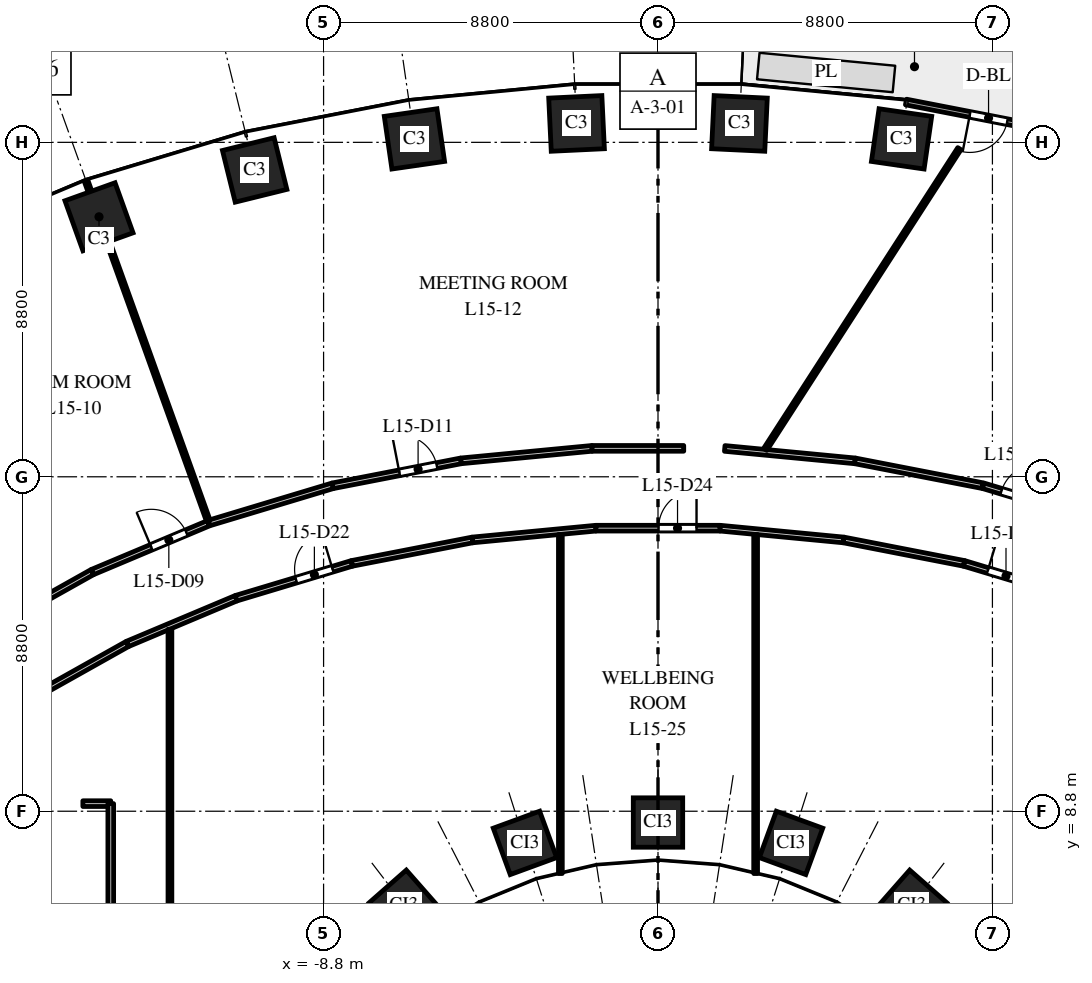
"""IFC4 building model, lengths in metres.
Left out: names, types, materials, properties, quantities, classifications, styles, units other than length and angle.
Written with IfcOpenShell. Run it as: python <this file> out.ifc"""

import sys

from ifc_helpers import new_model, si_unit, direction, frame, frame_2d, origin, origin_2d, place, context, subcontext, project, spatial, rectangle, extrude, element, fill, save


model = new_model("IFC4")
c1 = context("Model", 3, precision=1e-05, world=origin(), true_north=direction((0.0, 1.0)))
c2 = subcontext(c1, "Body", "Model", "MODEL_VIEW")
j1 = project(units=[si_unit("LENGTHUNIT", "METRE"), si_unit("PLANEANGLEUNIT", "RADIAN")], contexts=[c1])
p1 = place(None, origin())
s1 = spatial("IfcSite", under=j1, at=p1, CompositionType="ELEMENT")
p2 = place(p1, origin())
s2 = spatial("IfcBuilding", under=s1, at=p2, CompositionType="ELEMENT")
p3 = place(p2, frame((0.0, 0.0, 70.5)))
s3 = spatial("IfcBuildingStorey", under=s2, at=p3, CompositionType="ELEMENT", Elevation=70.5)
for number, where, z_axis, x_axis in (
    (1, (6.409, 26.491, 0.0), (0.0, 0.0, 1.0), (-0.99, 0.143, 0.0)),
    (2, (2.143, 26.898, 0.0), (0.0, 0.0, 1.0), (-0.999, 0.048, 0.0)),
    (3, (-2.143, 26.898, 0.0), (0.0, 0.0, 1.0), (-0.999, -0.048, 0.0)),
    (4, (-6.409, 26.491, 0.0), (0.0, 0.0, 1.0), (-0.99, -0.143, 0.0)),
    (5, (-10.613, 25.674, 0.0), (0.0, 0.0, 1.0), (-0.971, -0.24, 0.0)),
    (6, (-14.709, 24.441, 0.0), (0.0, 0.0, 1.0), (-0.941, -0.338, 0.0)),
):
    element("IfcColumn", number, at=place(p3, frame(where, z_axis=z_axis, x_axis=x_axis)), inside=s3, PredefinedType="COLUMN", context=c2, shape_type="SweptSolid", body=[
        extrude(rectangle(XDim=1.4, YDim=1.4, at=origin_2d()), origin(), (0.0, 0.0, 1.0), 4.0),
    ])
for number, where, z_axis, x_axis in (
    (7, (6.682, 6.334, 0.0), (0.0, 0.0, 1.0), (-0.751, 0.66, 0.0)),
    (8, (3.501, 7.967, 0.0), (0.0, 0.0, 1.0), (-0.939, 0.344, 0.0)),
    (9, (0.0, 8.503, 0.0), (0.0, 0.0, 1.0), (-1.0, 0.0, 0.0)),
    (10, (-3.501, 7.967, 0.0), (0.0, 0.0, 1.0), (-0.939, -0.344, 0.0)),
    (11, (-6.682, 6.334, 0.0), (0.0, 0.0, 1.0), (-0.751, -0.66, 0.0)),
):
    element("IfcColumn", number, at=place(p3, frame(where, z_axis=z_axis, x_axis=x_axis)), inside=s3, PredefinedType="COLUMN", context=c2, shape_type="SweptSolid", body=[
        extrude(rectangle(XDim=1.3, YDim=1.3, at=origin_2d()), origin(), (0.0, 0.0, 1.0), 4.0),
    ])
p4 = place(p3, frame((10.871, 26.617, 0.0), z_axis=(0.0, 0.0, 1.0), x_axis=(-0.981631174778, 0.190788460615, 0.0)))
e12 = element("IfcWall", 12, at=p4, inside=s3, PredefinedType="STANDARD", context=c2, shape_type="SweptSolid", body=[
    extrude(rectangle(XDim=4.426, YDim=0.15, at=frame_2d((2.213, 0.0))), origin(), (0.0, 0.0, 1.0), 3.7),
])
p5 = place(p4, frame((1.713, 0.0, 0.0)))
e13 = element("IfcOpeningElement", 13, at=p5, cuts=e12, PredefinedType="OPENING", context=c2, shape_type="SweptSolid", body=[
    extrude(rectangle(XDim=1.0, YDim=2.4, at=frame_2d((0.5, 1.2))), frame((0.0, 0.085, 0.0), z_axis=(0.0, -1.0, 0.0), x_axis=(1.0, 0.0, 0.0)), (0.0, 0.0, 1.0), 0.17),
])
p6 = place(p3, frame((-17.699, 13.513, 0.0), z_axis=(0.0, 0.0, 1.0), x_axis=(0.872072163686, 0.489377299559, 0.0)))
e14 = element("IfcWall", 14, at=p6, inside=s3, PredefinedType="PARTITIONING", context=c2, shape_type="SweptSolid", body=[
    extrude(rectangle(XDim=3.227, YDim=0.15, at=frame_2d((1.613, 0.0))), origin(), (0.0, 0.0, 1.0), 3.7),
])
p7 = place(p3, frame((-16.576, 11.735, 0.0), z_axis=(0.0, 0.0, 1.0), x_axis=(0.872164226045, 0.489213207924, 0.0)))
e15 = element("IfcWall", 15, at=p7, inside=s3, PredefinedType="PARTITIONING", context=c2, shape_type="SweptSolid", body=[
    extrude(rectangle(XDim=2.998, YDim=0.15, at=frame_2d((1.499, 0.0))), origin(), (0.0, 0.0, 1.0), 2.75),
])
p8 = place(p3, frame((-15.134, 9.0, 0.0), z_axis=(0.0, 0.0, 1.0), x_axis=(1.0, 0.0, 0.0)))
e16 = element("IfcWall", 16, at=p8, inside=s3, PredefinedType="PARTITIONING", context=c2, shape_type="SweptSolid", body=[
    extrude(rectangle(XDim=0.734, YDim=0.15, at=frame_2d((0.367, 0.0))), origin(), (0.0, 0.0, 1.0), 3.7),
])
p9 = place(p3, frame((-15.048, 25.383, 0.0), z_axis=(0.0, 0.0, 1.0), x_axis=(0.338338680362, -0.941024408488, 0.0)))
e17 = element("IfcWall", 17, at=p9, inside=s3, PredefinedType="PARTITIONING", context=c2, shape_type="SweptSolid", body=[
    extrude(rectangle(XDim=9.559, YDim=0.1, at=frame_2d((4.779, 0.0))), origin(), (0.0, 0.0, 1.0), 2.85),
])
p10 = place(p3, frame((-14.885, 15.092, 0.0), z_axis=(0.0, 0.0, 1.0), x_axis=(0.921844706698, 0.387559462189, 0.0)))
e18 = element("IfcWall", 18, at=p10, inside=s3, PredefinedType="PARTITIONING", context=c2, shape_type="SweptSolid", body=[
    extrude(rectangle(XDim=3.313, YDim=0.15, at=frame_2d((1.656, 0.0))), origin(), (0.0, 0.0, 1.0), 2.85),
])
p11 = place(p10, frame((1.684, 0.0, 0.0)))
e19 = element("IfcOpeningElement", 19, at=p11, cuts=e18, PredefinedType="OPENING", context=c2, shape_type="SweptSolid", body=[
    extrude(rectangle(XDim=1.0, YDim=2.1, at=frame_2d((0.5, 1.05))), frame((0.0, 0.085, 0.0), z_axis=(0.0, -1.0, 0.0), x_axis=(1.0, 0.0, 0.0)), (0.0, 0.0, 1.0), 0.17),
])
p12 = place(p3, frame((-14.4, -9.0, 0.0), z_axis=(0.0, 0.0, 1.0), x_axis=(0.0, 1.0, 0.0)))
e20 = element("IfcWall", 20, at=p12, inside=s3, PredefinedType="PARTITIONING", context=c2, shape_type="SweptSolid", body=[
    extrude(rectangle(XDim=18.0, YDim=0.15, at=frame_2d((9.0, 0.0))), origin(), (0.0, 0.0, 1.0), 3.7),
])
p13 = place(p12, frame((0.65, 0.0, 0.0)))
e21 = element("IfcOpeningElement", 21, at=p13, cuts=e20, PredefinedType="OPENING", context=c2, shape_type="SweptSolid", body=[
    extrude(rectangle(XDim=1.0, YDim=2.1, at=frame_2d((0.5, 1.05))), frame((0.0, 0.085, 0.0), z_axis=(0.0, -1.0, 0.0), x_axis=(1.0, 0.0, 0.0)), (0.0, 0.0, 1.0), 0.17),
])
p14 = place(p3, frame((-13.961, 13.202, 0.0), z_axis=(0.0, 0.0, 1.0), x_axis=(0.921753827375, 0.387775555857, 0.0)))
e22 = element("IfcWall", 22, at=p14, inside=s3, PredefinedType="PARTITIONING", context=c2, shape_type="SweptSolid", body=[
    extrude(rectangle(XDim=3.103, YDim=0.15, at=frame_2d((1.551, 0.0))), origin(), (0.0, 0.0, 1.0), 2.85),
])
p15 = place(p3, frame((-12.843, -13.587, 0.0), z_axis=(0.0, 0.0, 1.0), x_axis=(0.0, 1.0, 0.0)))
e23 = element("IfcWall", 23, at=p15, inside=s3, PredefinedType="PARTITIONING", context=c2, shape_type="SweptSolid", body=[
    extrude(rectangle(XDim=27.174, YDim=0.1, at=frame_2d((13.587, 0.0))), origin(), (0.0, 0.0, 1.0), 2.75),
])
p16 = place(p3, frame((-11.812, 16.384, 0.0), z_axis=(0.0, 0.0, 1.0), x_axis=(0.95754884035, 0.28827108482, 0.0)))
e24 = element("IfcWall", 24, at=p16, inside=s3, PredefinedType="PARTITIONING", context=c2, shape_type="SweptSolid", body=[
    extrude(rectangle(XDim=3.396, YDim=0.15, at=frame_2d((1.698, 0.0))), origin(), (0.0, 0.0, 1.0), 3.7),
])
p17 = place(p3, frame((-11.101, 14.405, 0.0), z_axis=(0.0, 0.0, 1.0), x_axis=(0.957612601062, 0.28805920622, 0.0)))
e25 = element("IfcWall", 25, at=p17, inside=s3, PredefinedType="PARTITIONING", context=c2, shape_type="SweptSolid", body=[
    extrude(rectangle(XDim=3.18, YDim=0.15, at=frame_2d((1.59, 0.0))), origin(), (0.0, 0.0, 1.0), 3.7),
])
p18 = place(p17, frame((1.65, 0.0, 0.0)))
e26 = element("IfcOpeningElement", 26, at=p18, cuts=e25, PredefinedType="OPENING", context=c2, shape_type="SweptSolid", body=[
    extrude(rectangle(XDim=1.0, YDim=2.1, at=frame_2d((0.5, 1.05))), frame((0.0, 0.085, 0.0), z_axis=(0.0, -1.0, 0.0), x_axis=(1.0, 0.0, 0.0)), (0.0, 0.0, 1.0), 0.17),
])
p19 = place(p3, frame((-8.56, 17.363, 0.0), z_axis=(0.0, 0.0, 1.0), x_axis=(0.981639027618, 0.1907480523, 0.0)))
e27 = element("IfcWall", 27, at=p19, inside=s3, PredefinedType="PARTITIONING", context=c2, shape_type="SweptSolid", body=[
    extrude(rectangle(XDim=3.439, YDim=0.15, at=frame_2d((1.72, 0.0))), origin(), (0.0, 0.0, 1.0), 2.85),
])
p20 = place(p19, frame((1.789, 0.0, 0.0)))
e28 = element("IfcOpeningElement", 28, at=p20, cuts=e27, PredefinedType="OPENING", context=c2, shape_type="SweptSolid", body=[
    extrude(rectangle(XDim=1.0, YDim=2.1, at=frame_2d((0.5, 1.05))), frame((0.0, 0.085, 0.0), z_axis=(0.0, -1.0, 0.0), x_axis=(1.0, 0.0, 0.0)), (0.0, 0.0, 1.0), 0.17),
])
p21 = place(p3, frame((-8.056, 15.321, 0.0), z_axis=(0.0, 0.0, 1.0), x_axis=(0.981604377859, 0.190926282547, 0.0)))
e29 = element("IfcWall", 29, at=p21, inside=s3, PredefinedType="PARTITIONING", context=c2, shape_type="SweptSolid", body=[
    extrude(rectangle(XDim=3.231, YDim=0.15, at=frame_2d((1.616, 0.0))), origin(), (0.0, 0.0, 1.0), 2.85),
])
p22 = place(p3, frame((-5.184, 18.019, 0.0), z_axis=(0.0, 0.0, 1.0), x_axis=(0.995482474707, 0.09494547146, 0.0)))
e30 = element("IfcWall", 30, at=p22, inside=s3, PredefinedType="PARTITIONING", context=c2, shape_type="SweptSolid", body=[
    extrude(rectangle(XDim=3.464, YDim=0.15, at=frame_2d((1.732, 0.0))), origin(), (0.0, 0.0, 1.0), 3.7),
])
p23 = place(p3, frame((-4.884, 15.938, 0.0), z_axis=(0.0, 0.0, 1.0), x_axis=(0.99547459835, 0.095028017131, 0.0)))
e31 = element("IfcWall", 31, at=p23, inside=s3, PredefinedType="PARTITIONING", context=c2, shape_type="SweptSolid", body=[
    extrude(rectangle(XDim=3.263, YDim=0.15, at=frame_2d((1.631, 0.0))), origin(), (0.0, 0.0, 1.0), 3.7),
])
p24 = place(p3, frame((-2.569, 7.161, 0.0), z_axis=(0.0, 0.0, 1.0), x_axis=(0.0, 1.0, 0.0)))
e32 = element("IfcWall", 32, at=p24, inside=s3, PredefinedType="PARTITIONING", context=c2, shape_type="SweptSolid", body=[
    extrude(rectangle(XDim=8.919, YDim=0.1, at=frame_2d((4.459, 0.0))), origin(), (0.0, 0.0, 1.0), 2.85),
])
p25 = place(p3, frame((-1.736, 18.348, 0.0), z_axis=(0.0, 0.0, 1.0), x_axis=(1.0, 0.0, 0.0)))
e33 = element("IfcWall", 33, at=p25, inside=s3, PredefinedType="PARTITIONING", context=c2, shape_type="SweptSolid", body=[
    extrude(rectangle(XDim=2.413, YDim=0.15, at=frame_2d((1.207, 0.0))), origin(), (0.0, 0.0, 1.0), 2.85),
])
p26 = place(p3, frame((-1.636, 16.248, 0.0), z_axis=(0.0, 0.0, 1.0), x_axis=(1.0, 0.0, 0.0)))
e34 = element("IfcWall", 34, at=p26, inside=s3, PredefinedType="PARTITIONING", context=c2, shape_type="SweptSolid", body=[
    extrude(rectangle(XDim=3.272, YDim=0.15, at=frame_2d((1.636, 0.0))), origin(), (0.0, 0.0, 1.0), 2.85),
])
p27 = place(p26, frame((1.65, 0.0, 0.0)))
e35 = element("IfcOpeningElement", 35, at=p27, cuts=e34, PredefinedType="OPENING", context=c2, shape_type="SweptSolid", body=[
    extrude(rectangle(XDim=1.0, YDim=2.1, at=frame_2d((0.5, 1.05))), frame((0.0, 0.085, 0.0), z_axis=(0.0, -1.0, 0.0), x_axis=(1.0, 0.0, 0.0)), (0.0, 0.0, 1.0), 0.17),
])
p28 = place(p3, frame((1.636, 16.248, 0.0), z_axis=(0.0, 0.0, 1.0), x_axis=(0.99547459835, -0.095028017131, 0.0)))
e36 = element("IfcWall", 36, at=p28, inside=s3, PredefinedType="PARTITIONING", context=c2, shape_type="SweptSolid", body=[
    extrude(rectangle(XDim=3.263, YDim=0.15, at=frame_2d((1.631, 0.0))), origin(), (0.0, 0.0, 1.0), 2.85),
])
p29 = place(p3, frame((1.756, 18.346, 0.0), z_axis=(0.0, 0.0, 1.0), x_axis=(0.99548367506, -0.094932885187, 0.0)))
e37 = element("IfcWall", 37, at=p29, inside=s3, PredefinedType="PARTITIONING", context=c2, shape_type="SweptSolid", body=[
    extrude(rectangle(XDim=3.444, YDim=0.15, at=frame_2d((1.722, 0.0))), origin(), (0.0, 0.0, 1.0), 2.85),
])
p30 = place(p3, frame((2.569, 7.161, 0.0), z_axis=(0.0, 0.0, 1.0), x_axis=(0.0, 1.0, 0.0)))
e38 = element("IfcWall", 38, at=p30, inside=s3, PredefinedType="PARTITIONING", context=c2, shape_type="SweptSolid", body=[
    extrude(rectangle(XDim=8.919, YDim=0.1, at=frame_2d((4.459, 0.0))), origin(), (0.0, 0.0, 1.0), 2.85),
])
p31 = place(p3, frame((2.822, 18.32, 0.0), z_axis=(0.0, 0.0, 1.0), x_axis=(0.542318130681, 0.840173223291, 0.0)))
e39 = element("IfcWall", 39, at=p31, inside=s3, PredefinedType="PARTITIONING", context=c2, shape_type="SweptSolid", body=[
    extrude(rectangle(XDim=9.42, YDim=0.1, at=frame_2d((4.71, 0.0))), origin(), (0.0, 0.0, 1.0), 2.85),
])
p32 = place(p3, frame((4.884, 15.938, 0.0), z_axis=(0.0, 0.0, 1.0), x_axis=(0.981604377859, -0.190926282547, 0.0)))
e40 = element("IfcWall", 40, at=p32, inside=s3, PredefinedType="PARTITIONING", context=c2, shape_type="SweptSolid", body=[
    extrude(rectangle(XDim=3.231, YDim=0.15, at=frame_2d((1.616, 0.0))), origin(), (0.0, 0.0, 1.0), 3.7),
])
p33 = place(p3, frame((5.184, 18.019, 0.0), z_axis=(0.0, 0.0, 1.0), x_axis=(0.981650299947, -0.190690032812, 0.0)))
e41 = element("IfcWall", 41, at=p33, inside=s3, PredefinedType="PARTITIONING", context=c2, shape_type="SweptSolid", body=[
    extrude(rectangle(XDim=3.42, YDim=0.15, at=frame_2d((1.71, 0.0))), origin(), (0.0, 0.0, 1.0), 3.7),
])
p34 = place(p3, frame((8.056, 15.321, 0.0), z_axis=(0.0, 0.0, 1.0), x_axis=(0.957612601062, -0.28805920622, 0.0)))
e42 = element("IfcWall", 42, at=p34, inside=s3, PredefinedType="PARTITIONING", context=c2, shape_type="SweptSolid", body=[
    extrude(rectangle(XDim=3.18, YDim=0.15, at=frame_2d((1.59, 0.0))), origin(), (0.0, 0.0, 1.0), 2.85),
])
p35 = place(p34, frame((0.65, 0.0, 0.0)))
e43 = element("IfcOpeningElement", 43, at=p35, cuts=e42, PredefinedType="OPENING", context=c2, shape_type="SweptSolid", body=[
    extrude(rectangle(XDim=1.0, YDim=2.1, at=frame_2d((0.5, 1.05))), frame((0.0, 0.085, 0.0), z_axis=(0.0, -1.0, 0.0), x_axis=(1.0, 0.0, 0.0)), (0.0, 0.0, 1.0), 0.17),
])
p36 = place(p3, frame((8.56, 17.363, 0.0), z_axis=(0.0, 0.0, 1.0), x_axis=(0.95754884035, -0.28827108482, 0.0)))
e44 = element("IfcWall", 44, at=p36, inside=s3, PredefinedType="PARTITIONING", context=c2, shape_type="SweptSolid", body=[
    extrude(rectangle(XDim=3.396, YDim=0.15, at=frame_2d((1.698, 0.0))), origin(), (0.0, 0.0, 1.0), 2.85),
])
p37 = place(p36, frame((0.496, 0.0, 0.0)))
e45 = element("IfcOpeningElement", 45, at=p37, cuts=e44, PredefinedType="OPENING", context=c2, shape_type="SweptSolid", body=[
    extrude(rectangle(XDim=1.0, YDim=2.1, at=frame_2d((0.5, 1.05))), frame((0.0, 0.085, 0.0), z_axis=(0.0, -1.0, 0.0), x_axis=(1.0, 0.0, 0.0)), (0.0, 0.0, 1.0), 0.17),
])
p38 = place(p5, origin())
e46 = element("IfcDoor", 46, at=p38, inside=s3, OperationType="SINGLE_SWING_RIGHT", PredefinedType="DOOR", context=c2, shape_type="SweptSolid", body=[
    extrude(rectangle(XDim=1.0, YDim=2.4, at=frame_2d((0.5, 1.2))), frame((0.0, 0.025, 0.0), z_axis=(0.0, -1.0, 0.0), x_axis=(1.0, 0.0, 0.0)), (0.0, 0.0, 1.0), 0.05),
])
fill(e13, e46)
p39 = place(p11, origin())
e47 = element("IfcDoor", 47, at=p39, inside=s3, OperationType="SINGLE_SWING_LEFT", PredefinedType="DOOR", context=c2, shape_type="SweptSolid", body=[
    extrude(rectangle(XDim=1.0, YDim=2.1, at=frame_2d((0.5, 1.05))), frame((0.0, 0.025, 0.0), z_axis=(0.0, -1.0, 0.0), x_axis=(1.0, 0.0, 0.0)), (0.0, 0.0, 1.0), 0.05),
])
fill(e19, e47)
p40 = place(p20, origin())
e48 = element("IfcDoor", 48, at=p40, inside=s3, OperationType="SINGLE_SWING_LEFT", PredefinedType="DOOR", context=c2, shape_type="SweptSolid", body=[
    extrude(rectangle(XDim=1.0, YDim=2.1, at=frame_2d((0.5, 1.05))), frame((0.0, 0.025, 0.0), z_axis=(0.0, -1.0, 0.0), x_axis=(1.0, 0.0, 0.0)), (0.0, 0.0, 1.0), 0.05),
])
fill(e28, e48)
p41 = place(p37, origin())
e49 = element("IfcDoor", 49, at=p41, inside=s3, OperationType="SINGLE_SWING_RIGHT", PredefinedType="DOOR", context=c2, shape_type="SweptSolid", body=[
    extrude(rectangle(XDim=1.0, YDim=2.1, at=frame_2d((0.5, 1.05))), frame((0.0, 0.025, 0.0), z_axis=(0.0, -1.0, 0.0), x_axis=(1.0, 0.0, 0.0)), (0.0, 0.0, 1.0), 0.05),
])
fill(e45, e49)
p42 = place(p18, origin())
e50 = element("IfcDoor", 50, at=p42, inside=s3, OperationType="SINGLE_SWING_RIGHT", PredefinedType="DOOR", context=c2, shape_type="SweptSolid", body=[
    extrude(rectangle(XDim=1.0, YDim=2.1, at=frame_2d((0.5, 1.05))), frame((0.0, 0.025, 0.0), z_axis=(0.0, -1.0, 0.0), x_axis=(1.0, 0.0, 0.0)), (0.0, 0.0, 1.0), 0.05),
])
fill(e26, e50)
p43 = place(p27, origin())
e51 = element("IfcDoor", 51, at=p43, inside=s3, OperationType="SINGLE_SWING_RIGHT", PredefinedType="DOOR", context=c2, shape_type="SweptSolid", body=[
    extrude(rectangle(XDim=1.0, YDim=2.1, at=frame_2d((0.5, 1.05))), frame((0.0, 0.025, 0.0), z_axis=(0.0, -1.0, 0.0), x_axis=(1.0, 0.0, 0.0)), (0.0, 0.0, 1.0), 0.05),
])
fill(e35, e51)
p44 = place(p35, origin())
e52 = element("IfcDoor", 52, at=p44, inside=s3, OperationType="SINGLE_SWING_LEFT", PredefinedType="DOOR", context=c2, shape_type="SweptSolid", body=[
    extrude(rectangle(XDim=1.0, YDim=2.1, at=frame_2d((0.5, 1.05))), frame((0.0, 0.025, 0.0), z_axis=(0.0, -1.0, 0.0), x_axis=(1.0, 0.0, 0.0)), (0.0, 0.0, 1.0), 0.05),
])
fill(e43, e52)
save(model, sys.argv[1])
